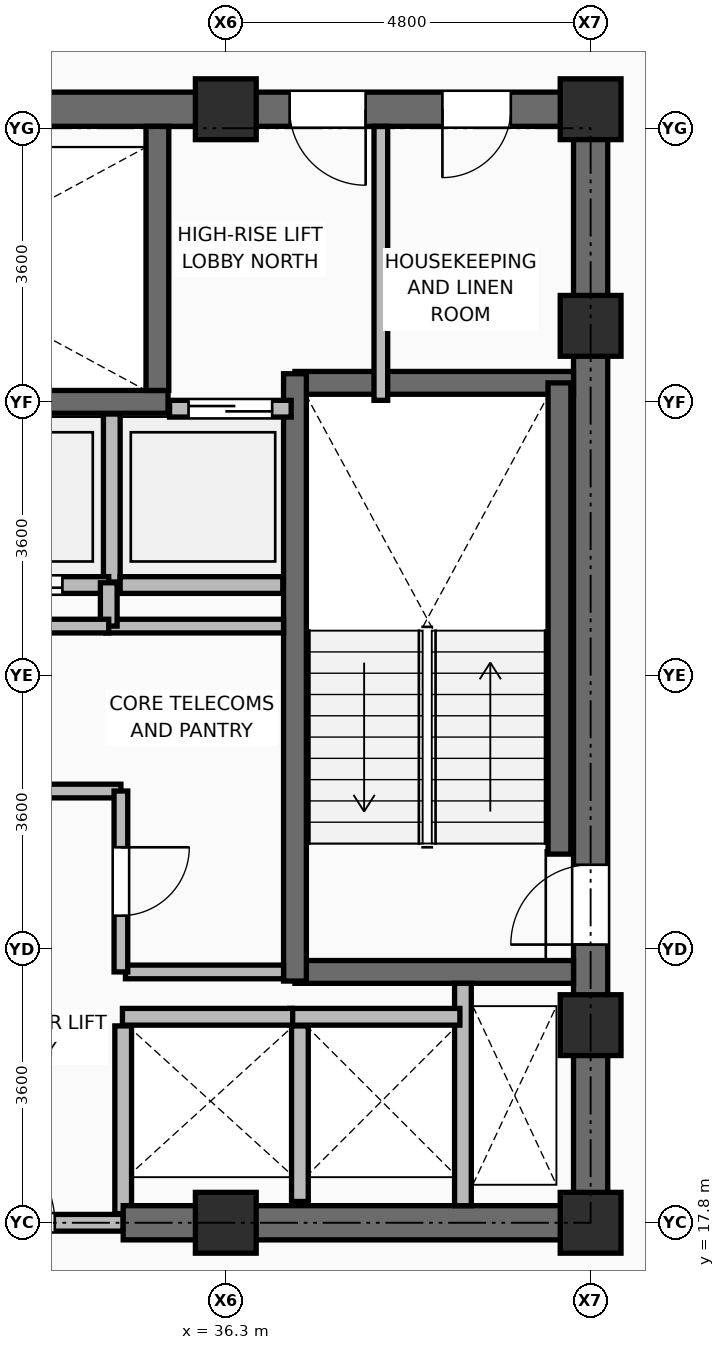
"""IFC4 building model, lengths in metres.
Left out: names, types, materials, properties, quantities, classifications, styles, units other than length and angle.
Written with IfcOpenShell. Run it as: python <this file> out.ifc"""

import sys

from ifc_helpers import new_model, si_unit, direction, frame, frame_2d, origin, origin_2d, place, context, subcontext, project, spatial, rectangle, extrude, element, fill, save


model = new_model("IFC4")
c1 = context("Model", 3, precision=1e-05, world=origin(), true_north=direction((0.0, 1.0)))
c2 = subcontext(c1, "Body", "Model", "MODEL_VIEW")
j1 = project(units=[si_unit("LENGTHUNIT", "METRE"), si_unit("PLANEANGLEUNIT", "RADIAN")], contexts=[c1])
p1 = place(None, origin())
s1 = spatial("IfcSite", under=j1, at=p1, CompositionType="ELEMENT")
p2 = place(p1, origin())
s2 = spatial("IfcBuilding", under=s1, at=p2, CompositionType="ELEMENT")
p3 = place(p2, frame((0.0, 0.0, 216.15)))
s3 = spatial("IfcBuildingStorey", under=s2, at=p3, CompositionType="ELEMENT", Elevation=216.15)
for number, where, z_axis, x_axis in (
    (1, (36.3, 17.8, 0.0), (0.0, 0.0, 1.0), (1.0, 0.0, 0.0)),
    (2, (41.1, 17.8, 0.0), (0.0, 0.0, 1.0), (1.0, 0.0, 0.0)),
    (3, (41.1, 20.4, 0.0), (0.0, 0.0, 1.0), (1.0, 0.0, 0.0)),
    (4, (41.1, 29.6, 0.0), (0.0, 0.0, 1.0), (1.0, 0.0, 0.0)),
    (5, (36.3, 32.45, 0.0), (0.0, 0.0, 1.0), (1.0, 0.0, 0.0)),
    (6, (41.1, 32.45, 0.0), (0.0, 0.0, 1.0), (1.0, 0.0, 0.0)),
):
    element("IfcColumn", number, at=place(p3, frame(where, z_axis=z_axis, x_axis=x_axis)), inside=s3, PredefinedType="COLUMN", context=c2, shape_type="SweptSolid", body=[
        extrude(rectangle(XDim=0.8, YDim=0.8, at=origin_2d()), origin(), (0.0, 0.0, 1.0), 3.75),
    ])
p4 = place(p3, frame((34.95, 17.92, 0.0), z_axis=(0.0, 0.0, 1.0), x_axis=(0.0, 1.0, 0.0)))
e7 = element("IfcWall", 7, at=p4, inside=s3, PredefinedType="PARTITIONING", context=c2, shape_type="SweptSolid", body=[
    extrude(rectangle(XDim=2.47, YDim=0.22, at=frame_2d((1.235, 0.0))), origin(), (0.0, 0.0, 1.0), 3.545),
])
p5 = place(p3, frame((37.275, 18.08, 0.0), z_axis=(0.0, 0.0, 1.0), x_axis=(0.0, 1.0, 0.0)))
e8 = element("IfcWall", 8, at=p5, inside=s3, PredefinedType="PARTITIONING", context=c2, shape_type="SweptSolid", body=[
    extrude(rectangle(XDim=2.31, YDim=0.22, at=frame_2d((1.155, 0.0))), origin(), (0.0, 0.0, 1.0), 3.545),
])
p6 = place(p3, frame((34.8, 26.23, 0.0), z_axis=(0.0, 0.0, 1.0), x_axis=(0.0, 1.0, 0.0)))
e9 = element("IfcWall", 9, at=p6, inside=s3, PredefinedType="PARTITIONING", context=c2, shape_type="SweptSolid", body=[
    extrude(rectangle(XDim=2.21, YDim=0.22, at=frame_2d((1.105, 0.0))), origin(), (0.0, 0.0, 1.0), 3.545),
])
p7 = place(p3, frame((34.91, 26.19, 0.0), z_axis=(0.0, 0.0, 1.0), x_axis=(1.0, 0.0, 0.0)))
e10 = element("IfcWall", 10, at=p7, inside=s3, PredefinedType="PARTITIONING", context=c2, shape_type="SweptSolid", body=[
    extrude(rectangle(XDim=2.14, YDim=0.22, at=frame_2d((1.07, 0.0))), origin(), (0.0, 0.0, 1.0), 3.545),
])
p8 = place(p3, frame((32.45, 17.8, 0.0), z_axis=(0.0, 0.0, 1.0), x_axis=(1.0, 0.0, 0.0)))
e11 = element("IfcWall", 11, at=p8, inside=s3, PredefinedType="PARTITIONING", context=c2, shape_type="SweptSolid", body=[
    extrude(rectangle(XDim=2.5, YDim=0.22, at=frame_2d((1.25, 0.0))), origin(), (0.0, 0.0, 1.0), 3.081),
])
p9 = place(p8, frame((0.4, 0.0, 0.0)))
e12 = element("IfcOpeningElement", 12, at=p9, cuts=e11, PredefinedType="OPENING", context=c2, shape_type="SweptSolid", body=[
    extrude(rectangle(XDim=1.2, YDim=2.1, at=frame_2d((0.6, 1.05))), frame((0.0, 0.12, 0.0), z_axis=(0.0, -1.0, 0.0), x_axis=(1.0, 0.0, 0.0)), (0.0, 0.0, 1.0), 0.24),
])
p10 = place(p3, frame((34.95, 17.8, 0.0), z_axis=(0.0, 0.0, 1.0), x_axis=(1.0, 0.0, 0.0)))
e13 = element("IfcWall", 13, at=p10, inside=s3, PredefinedType="SHEAR", context=c2, shape_type="SweptSolid", body=[
    extrude(rectangle(XDim=6.375, YDim=0.45, at=frame_2d((3.188, 0.0))), origin(), (0.0, 0.0, 1.0), 3.57),
])
p11 = place(p3, frame((21.675, 32.45, 0.0), z_axis=(0.0, 0.0, 1.0), x_axis=(1.0, 0.0, 0.0)))
e14 = element("IfcWall", 14, at=p11, inside=s3, PredefinedType="SHEAR", context=c2, shape_type="SweptSolid", body=[
    extrude(rectangle(XDim=19.65, YDim=0.45, at=frame_2d((9.825, 0.0))), origin(), (0.0, 0.0, 1.0), 3.57),
])
p12 = place(p11, frame((2.075, 0.0, 0.0)))
e15 = element("IfcOpeningElement", 15, at=p12, cuts=e14, PredefinedType="OPENING", context=c2, shape_type="SweptSolid", body=[
    extrude(rectangle(XDim=1.1, YDim=2.1, at=frame_2d((0.55, 1.05))), frame((0.0, 0.235, 0.0), z_axis=(0.0, -1.0, 0.0), x_axis=(1.0, 0.0, 0.0)), (0.0, 0.0, 1.0), 0.47),
])
p13 = place(p11, frame((15.465, 0.0, 0.0)))
e16 = element("IfcOpeningElement", 16, at=p13, cuts=e14, PredefinedType="OPENING", context=c2, shape_type="SweptSolid", body=[
    extrude(rectangle(XDim=1.0, YDim=2.1, at=frame_2d((0.5, 1.05))), frame((0.0, 0.235, 0.0), z_axis=(0.0, -1.0, 0.0), x_axis=(1.0, 0.0, 0.0)), (0.0, 0.0, 1.0), 0.47),
])
p14 = place(p11, frame((17.475, 0.0, 0.0)))
e17 = element("IfcOpeningElement", 17, at=p14, cuts=e14, PredefinedType="OPENING", context=c2, shape_type="SweptSolid", body=[
    extrude(rectangle(XDim=0.9, YDim=2.1, at=frame_2d((0.45, 1.05))), frame((0.0, 0.235, 0.0), z_axis=(0.0, -1.0, 0.0), x_axis=(1.0, 0.0, 0.0)), (0.0, 0.0, 1.0), 0.47),
])
p15 = place(p3, frame((41.1, 18.025, 0.0), z_axis=(0.0, 0.0, 1.0), x_axis=(0.0, 1.0, 0.0)))
e18 = element("IfcWall", 18, at=p15, inside=s3, PredefinedType="SHEAR", context=c2, shape_type="SweptSolid", body=[
    extrude(rectangle(XDim=14.2, YDim=0.45, at=frame_2d((7.1, 0.0))), origin(), (0.0, 0.0, 1.0), 3.57),
])
p16 = place(p15, frame((3.435, 0.0, 0.0)))
e19 = element("IfcOpeningElement", 19, at=p16, cuts=e18, PredefinedType="OPENING", context=c2, shape_type="SweptSolid", body=[
    extrude(rectangle(XDim=1.05, YDim=2.1, at=frame_2d((0.525, 1.05))), frame((0.0, 0.235, 0.0), z_axis=(0.0, -1.0, 0.0), x_axis=(1.0, 0.0, 0.0)), (0.0, 0.0, 1.0), 0.47),
])
for number, where, z_axis, x_axis in (
    (20, (37.21, 21.1, 0.0), (0.0, 0.0, 1.0), (1.0, 0.0, 0.0)),
    (21, (37.21, 28.85, 0.0), (0.0, 0.0, 1.0), (1.0, 0.0, 0.0)),
):
    element("IfcWall", number, at=place(p3, frame(where, z_axis=z_axis, x_axis=x_axis)), inside=s3, PredefinedType="SHEAR", context=c2, shape_type="SweptSolid", body=[
        extrude(rectangle(XDim=3.665, YDim=0.3, at=frame_2d((1.833, 0.0))), origin(), (0.0, 0.0, 1.0), 3.57),
    ])
p17 = place(p3, frame((37.21, 20.98, 0.0), z_axis=(0.0, 0.0, 1.0), x_axis=(0.0, 1.0, 0.0)))
e22 = element("IfcWall", 22, at=p17, inside=s3, PredefinedType="SHEAR", context=c2, shape_type="SweptSolid", body=[
    extrude(rectangle(XDim=7.99, YDim=0.3, at=frame_2d((3.995, 0.0))), origin(), (0.0, 0.0, 1.0), 3.57),
])
p18 = place(p3, frame((40.69, 22.65, 0.0), z_axis=(0.0, 0.0, 1.0), x_axis=(0.0, 1.0, 0.0)))
e23 = element("IfcWall", 23, at=p18, inside=s3, PredefinedType="SHEAR", context=c2, shape_type="SweptSolid", body=[
    extrude(rectangle(XDim=6.2, YDim=0.3, at=frame_2d((3.1, 0.0))), origin(), (0.0, 0.0, 1.0), 3.57),
])
p19 = place(p3, frame((27.51, 28.6, 0.0), z_axis=(0.0, 0.0, 1.0), x_axis=(1.0, 0.0, 0.0)))
e24 = element("IfcWall", 24, at=p19, inside=s3, PredefinedType="SHEAR", context=c2, shape_type="SweptSolid", body=[
    extrude(rectangle(XDim=8.03, YDim=0.3, at=frame_2d((4.015, 0.0))), origin(), (0.0, 0.0, 1.0), 3.57),
])
p20 = place(p3, frame((35.4, 28.75, 0.0), z_axis=(0.0, 0.0, 1.0), x_axis=(0.0, 1.0, 0.0)))
e25 = element("IfcWall", 25, at=p20, inside=s3, PredefinedType="SHEAR", context=c2, shape_type="SweptSolid", body=[
    extrude(rectangle(XDim=3.475, YDim=0.3, at=frame_2d((1.738, 0.0))), origin(), (0.0, 0.0, 1.0), 3.57),
])
p21 = place(p3, frame((39.42, 18.025, 0.0), z_axis=(0.0, 0.0, 1.0), x_axis=(0.0, 1.0, 0.0)))
e26 = element("IfcWall", 26, at=p21, inside=s3, PredefinedType="PARTITIONING", context=c2, shape_type="SweptSolid", body=[
    extrude(rectangle(XDim=2.925, YDim=0.22, at=frame_2d((1.462, 0.0))), origin(), (0.0, 0.0, 1.0), 3.55),
])
for number, where, z_axis, x_axis in (
    (27, (37.14, 20.51, 0.0), (0.0, 0.0, 1.0), (1.0, 0.0, 0.0)),
    (28, (34.94, 20.51, 0.0), (0.0, 0.0, 1.0), (1.0, 0.0, 0.0)),
):
    element("IfcWall", number, at=place(p3, frame(where, z_axis=z_axis, x_axis=x_axis)), inside=s3, PredefinedType="PARTITIONING", context=c2, shape_type="SweptSolid", body=[
        extrude(rectangle(XDim=2.24, YDim=0.22, at=frame_2d((1.12, 0.0))), origin(), (0.0, 0.0, 1.0), 3.55),
    ])
p22 = place(p3, frame((32.44, 26.19, 0.0), z_axis=(0.0, 0.0, 1.0), x_axis=(1.0, 0.0, 0.0)))
e29 = element("IfcWall", 29, at=p22, inside=s3, PredefinedType="PARTITIONING", context=c2, shape_type="SweptSolid", body=[
    extrude(rectangle(XDim=2.32, YDim=0.22, at=frame_2d((1.16, 0.0))), origin(), (0.0, 0.0, 1.0), 3.55),
])
p23 = place(p22, frame((0.61, 0.0, 0.0)))
e30 = element("IfcOpeningElement", 30, at=p23, cuts=e29, PredefinedType="OPENING", context=c2, shape_type="SweptSolid", body=[
    extrude(rectangle(XDim=1.1, YDim=2.2, at=frame_2d((0.55, 1.1))), frame((0.0, 0.12, 0.0), z_axis=(0.0, -1.0, 0.0), x_axis=(1.0, 0.0, 0.0)), (0.0, 0.0, 1.0), 0.24),
])
p24 = place(p3, frame((35.56, 28.51, 0.0), z_axis=(0.0, 0.0, 1.0), x_axis=(1.0, 0.0, 0.0)))
e31 = element("IfcWall", 31, at=p24, inside=s3, PredefinedType="PARTITIONING", context=c2, shape_type="SweptSolid", body=[
    extrude(rectangle(XDim=1.6, YDim=0.22, at=frame_2d((0.8, 0.0))), origin(), (0.0, 0.0, 1.0), 3.55),
])
p25 = place(p24, frame((0.25, 0.0, 0.0)))
e32 = element("IfcOpeningElement", 32, at=p25, cuts=e31, PredefinedType="OPENING", context=c2, shape_type="SweptSolid", body=[
    extrude(rectangle(XDim=1.1, YDim=2.2, at=frame_2d((0.55, 1.1))), frame((0.0, 0.12, 0.0), z_axis=(0.0, -1.0, 0.0), x_axis=(1.0, 0.0, 0.0)), (0.0, 0.0, 1.0), 0.24),
])
p26 = place(p3, frame((34.98, 21.1, 0.0), z_axis=(0.0, 0.0, 1.0), x_axis=(1.0, 0.0, 0.0)))
e33 = element("IfcWall", 33, at=p26, inside=s3, PredefinedType="PARTITIONING", context=c2, shape_type="SweptSolid", body=[
    extrude(rectangle(XDim=2.08, YDim=0.18, at=frame_2d((1.04, 0.0))), origin(), (0.0, 0.0, 1.0), 3.55),
])
p27 = place(p3, frame((34.72, 25.65, 0.0), z_axis=(0.0, 0.0, 1.0), x_axis=(1.0, 0.0, 0.0)))
e34 = element("IfcWall", 34, at=p27, inside=s3, PredefinedType="PARTITIONING", context=c2, shape_type="SweptSolid", body=[
    extrude(rectangle(XDim=2.34, YDim=0.18, at=frame_2d((1.17, 0.0))), origin(), (0.0, 0.0, 1.0), 3.55),
])
p28 = place(p3, frame((34.76, 25.65, 0.0), z_axis=(0.0, 0.0, 1.0), x_axis=(0.0, 1.0, 0.0)))
e35 = element("IfcWall", 35, at=p28, inside=s3, PredefinedType="PARTITIONING", context=c2, shape_type="SweptSolid", body=[
    extrude(rectangle(XDim=0.57, YDim=0.22, at=frame_2d((0.285, 0.0))), origin(), (0.0, 0.0, 1.0), 3.55),
])
p29 = place(p3, frame((33.08, 25.65, 0.0), z_axis=(0.0, 0.0, 1.0), x_axis=(1.0, 0.0, 0.0)))
e36 = element("IfcWall", 36, at=p29, inside=s3, PredefinedType="PARTITIONING", context=c2, shape_type="SweptSolid", body=[
    extrude(rectangle(XDim=1.68, YDim=0.18, at=frame_2d((0.84, 0.0))), origin(), (0.0, 0.0, 1.0), 3.55),
])
p30 = place(p3, frame((33.08, 23.48, 0.0), z_axis=(0.0, 0.0, 1.0), x_axis=(1.0, 0.0, 0.0)))
e37 = element("IfcWall", 37, at=p30, inside=s3, PredefinedType="PARTITIONING", context=c2, shape_type="SweptSolid", body=[
    extrude(rectangle(XDim=1.84, YDim=0.18, at=frame_2d((0.92, 0.0))), origin(), (0.0, 0.0, 1.0), 3.55),
])
p31 = place(p3, frame((34.92, 21.1, 0.0), z_axis=(0.0, 0.0, 1.0), x_axis=(0.0, 1.0, 0.0)))
e38 = element("IfcWall", 38, at=p31, inside=s3, PredefinedType="PARTITIONING", context=c2, shape_type="SweptSolid", body=[
    extrude(rectangle(XDim=2.38, YDim=0.18, at=frame_2d((1.19, 0.0))), origin(), (0.0, 0.0, 1.0), 3.55),
])
p32 = place(p31, frame((0.74, 0.0, 0.0)))
e39 = element("IfcOpeningElement", 39, at=p32, cuts=e38, PredefinedType="OPENING", context=c2, shape_type="SweptSolid", body=[
    extrude(rectangle(XDim=0.9, YDim=2.1, at=frame_2d((0.45, 1.05))), frame((0.0, 0.1, 0.0), z_axis=(0.0, -1.0, 0.0), x_axis=(1.0, 0.0, 0.0)), (0.0, 0.0, 1.0), 0.2),
])
p33 = place(p3, frame((38.34, 28.62, 0.0), z_axis=(0.0, 0.0, 1.0), x_axis=(0.0, 1.0, 0.0)))
e40 = element("IfcWall", 40, at=p33, inside=s3, PredefinedType="PARTITIONING", context=c2, shape_type="SweptSolid", body=[
    extrude(rectangle(XDim=3.605, YDim=0.18, at=frame_2d((1.802, 0.0))), origin(), (0.0, 0.0, 1.0), 3.55),
])
p34 = place(p9, origin())
e41 = element("IfcDoor", 41, at=p34, inside=s3, OperationType="SINGLE_SWING_LEFT", PredefinedType="DOOR", context=c2, shape_type="SweptSolid", body=[
    extrude(rectangle(XDim=1.2, YDim=2.1, at=frame_2d((0.6, 1.05))), frame((0.0, 0.025, 0.0), z_axis=(0.0, -1.0, 0.0), x_axis=(1.0, 0.0, 0.0)), (0.0, 0.0, 1.0), 0.05),
])
fill(e12, e41)
p35 = place(p16, origin())
e42 = element("IfcDoor", 42, at=p35, inside=s3, OperationType="SINGLE_SWING_LEFT", PredefinedType="DOOR", context=c2, shape_type="SweptSolid", body=[
    extrude(rectangle(XDim=1.05, YDim=2.1, at=frame_2d((0.525, 1.05))), frame((0.0, 0.025, 0.0), z_axis=(0.0, -1.0, 0.0), x_axis=(1.0, 0.0, 0.0)), (0.0, 0.0, 1.0), 0.05),
])
fill(e19, e42)
p36 = place(p23, frame((1.1, 0.0, 0.0), z_axis=(0.0, 0.0, 1.0), x_axis=(-1.0, 0.0, 0.0)))
e43 = element("IfcDoor", 43, at=p36, inside=s3, OperationType="DOUBLE_DOOR_SLIDING", PredefinedType="DOOR", context=c2, shape_type="SweptSolid", body=[
    extrude(rectangle(XDim=1.1, YDim=2.2, at=frame_2d((0.55, 1.1))), frame((0.0, 0.025, 0.0), z_axis=(0.0, -1.0, 0.0), x_axis=(1.0, 0.0, 0.0)), (0.0, 0.0, 1.0), 0.05),
])
fill(e30, e43)
p37 = place(p25, origin())
e44 = element("IfcDoor", 44, at=p37, inside=s3, OperationType="DOUBLE_DOOR_SLIDING", PredefinedType="DOOR", context=c2, shape_type="SweptSolid", body=[
    extrude(rectangle(XDim=1.1, YDim=2.2, at=frame_2d((0.55, 1.1))), frame((0.0, 0.025, 0.0), z_axis=(0.0, -1.0, 0.0), x_axis=(1.0, 0.0, 0.0)), (0.0, 0.0, 1.0), 0.05),
])
fill(e32, e44)
p38 = place(p32, frame((0.9, 0.0, 0.0), z_axis=(0.0, 0.0, 1.0), x_axis=(-1.0, 0.0, 0.0)))
e45 = element("IfcDoor", 45, at=p38, inside=s3, OperationType="SINGLE_SWING_LEFT", PredefinedType="DOOR", context=c2, shape_type="SweptSolid", body=[
    extrude(rectangle(XDim=0.9, YDim=2.1, at=frame_2d((0.45, 1.05))), frame((0.0, 0.025, 0.0), z_axis=(0.0, -1.0, 0.0), x_axis=(1.0, 0.0, 0.0)), (0.0, 0.0, 1.0), 0.05),
])
fill(e39, e45)
p39 = place(p13, frame((1.0, 0.0, 0.0), z_axis=(0.0, 0.0, 1.0), x_axis=(-1.0, 0.0, 0.0)))
e46 = element("IfcDoor", 46, at=p39, inside=s3, OperationType="SINGLE_SWING_LEFT", PredefinedType="DOOR", context=c2, shape_type="SweptSolid", body=[
    extrude(rectangle(XDim=1.0, YDim=2.1, at=frame_2d((0.5, 1.05))), frame((0.0, 0.025, 0.0), z_axis=(0.0, -1.0, 0.0), x_axis=(1.0, 0.0, 0.0)), (0.0, 0.0, 1.0), 0.05),
])
fill(e16, e46)
p40 = place(p14, frame((0.9, 0.0, 0.0), z_axis=(0.0, 0.0, 1.0), x_axis=(-1.0, 0.0, 0.0)))
e47 = element("IfcDoor", 47, at=p40, inside=s3, OperationType="SINGLE_SWING_RIGHT", PredefinedType="DOOR", context=c2, shape_type="SweptSolid", body=[
    extrude(rectangle(XDim=0.9, YDim=2.1, at=frame_2d((0.45, 1.05))), frame((0.0, 0.025, 0.0), z_axis=(0.0, -1.0, 0.0), x_axis=(1.0, 0.0, 0.0)), (0.0, 0.0, 1.0), 0.05),
])
fill(e17, e47)
save(model, sys.argv[1])
